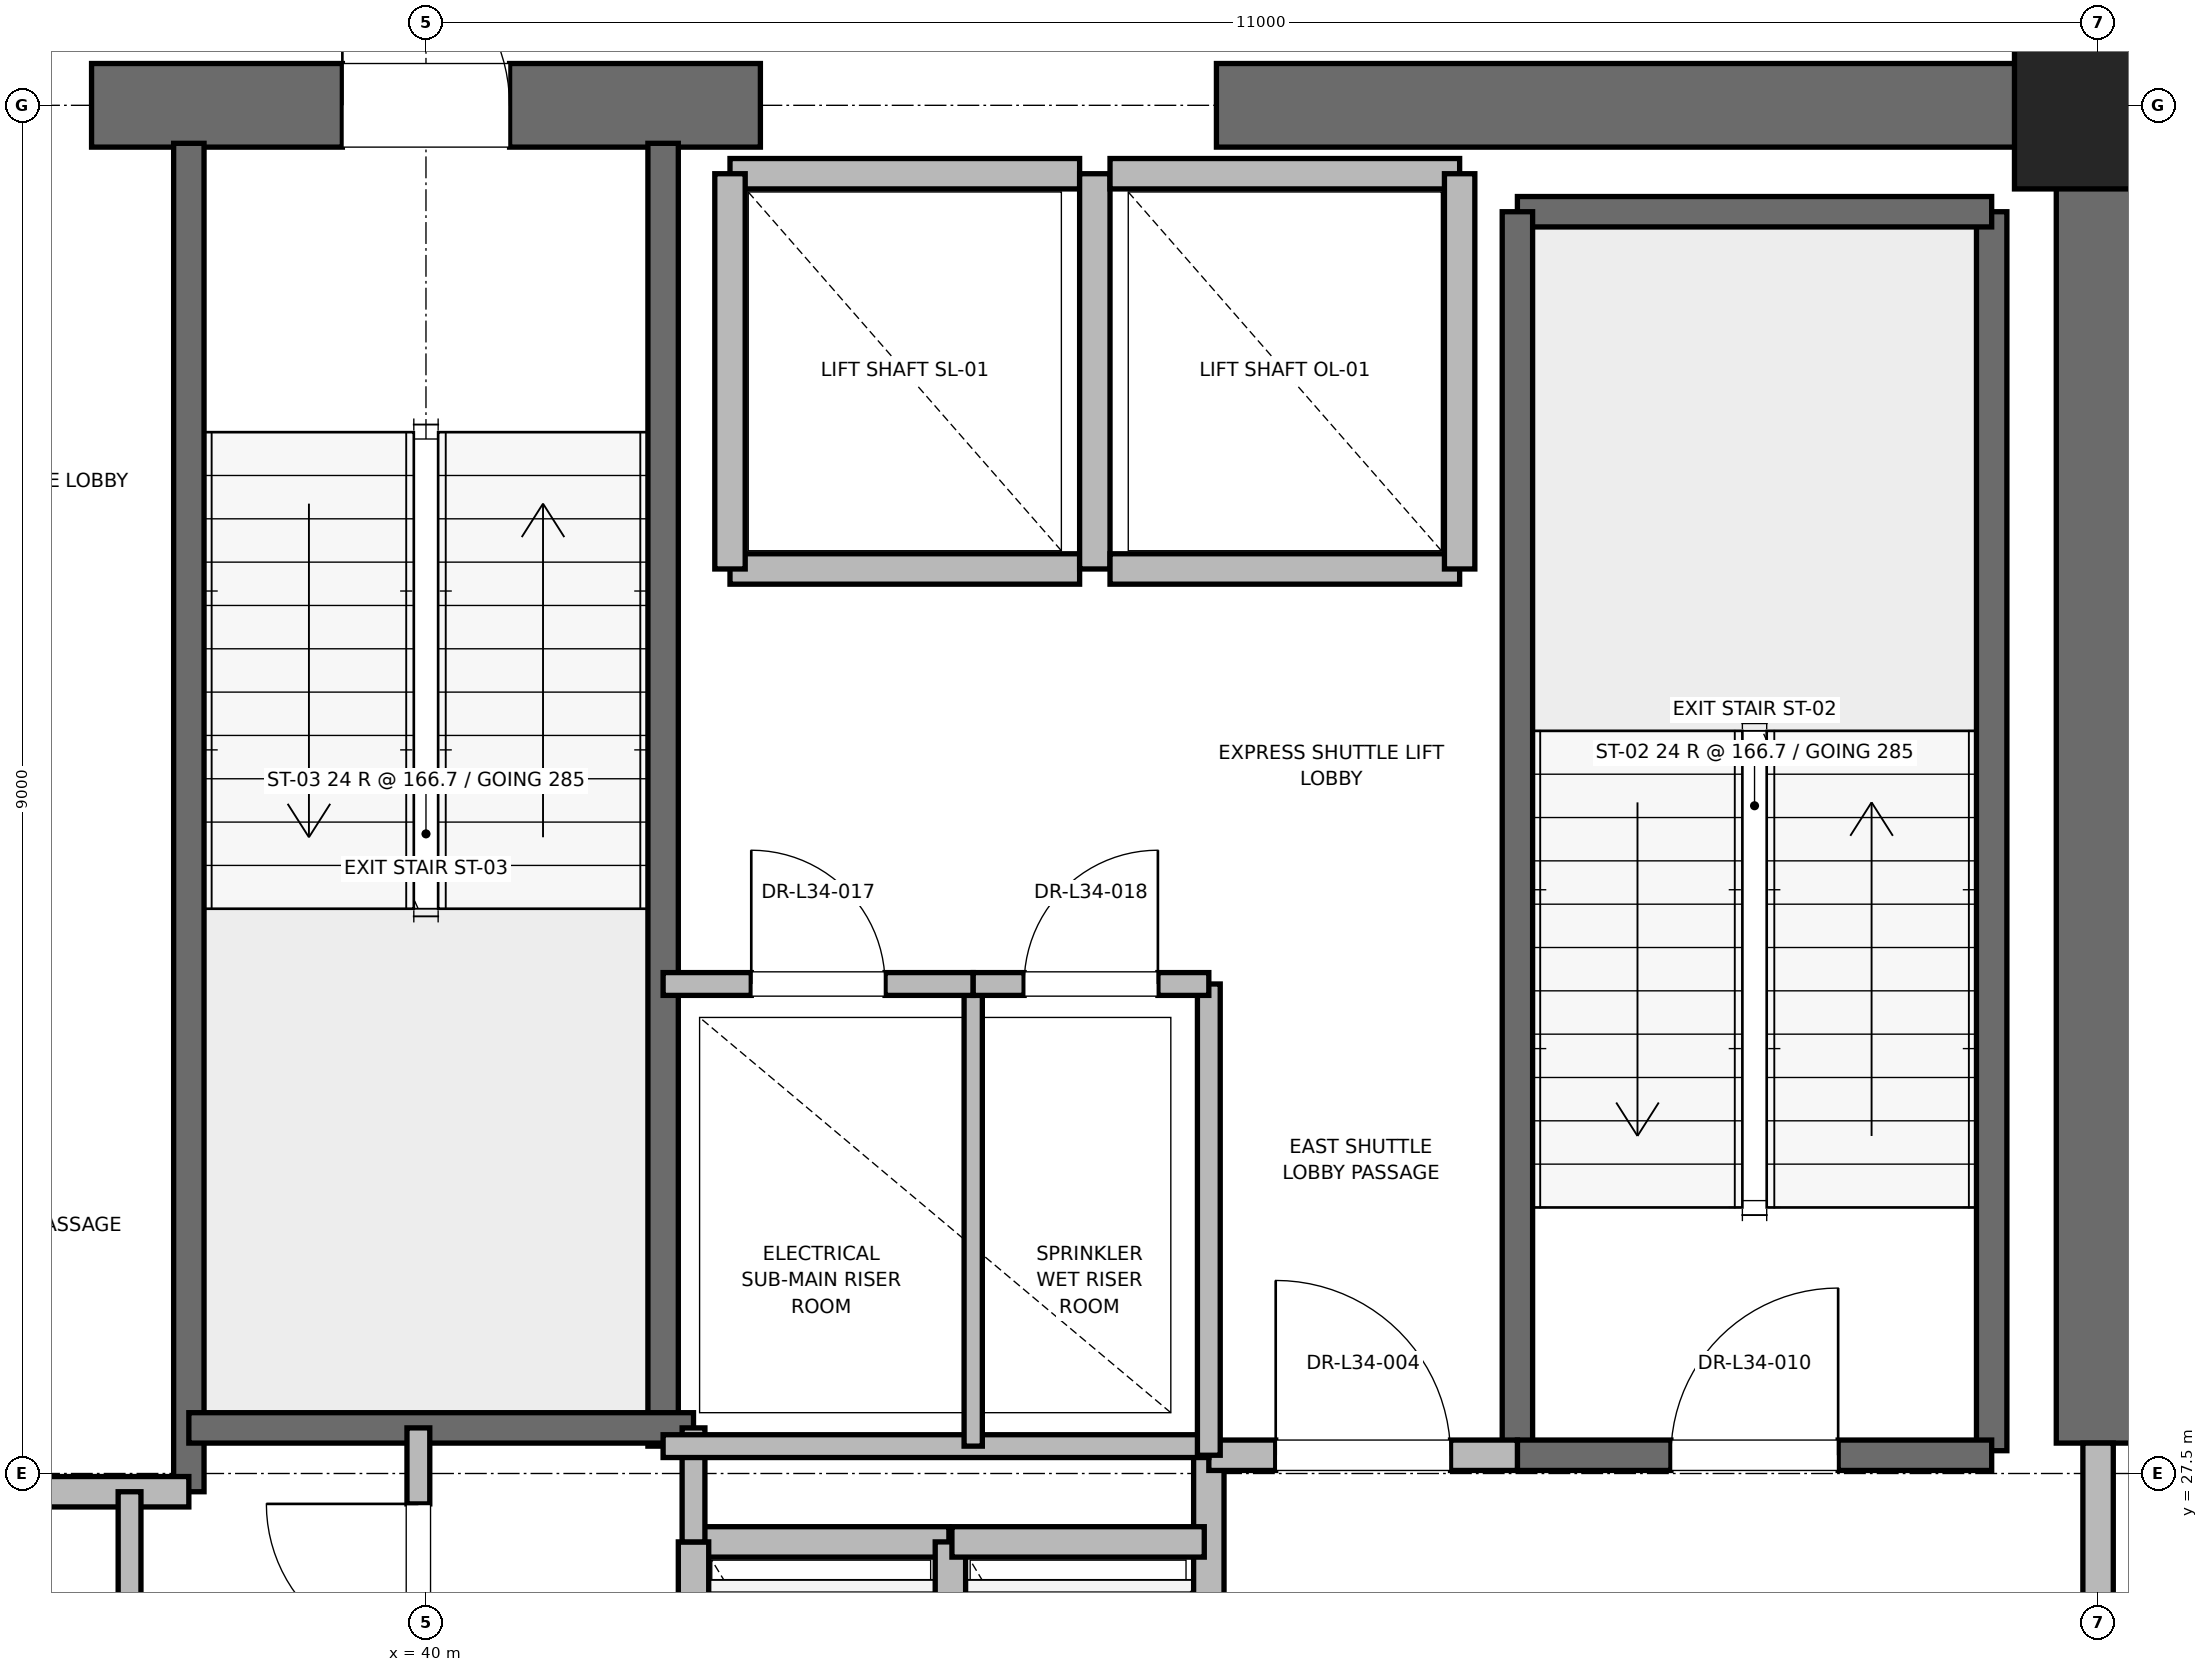
"""IFC4 building model, lengths in metres.
Left out: names, types, materials, properties, quantities, classifications, styles, units other than length and angle.
Written with IfcOpenShell. Run it as: python <this file> out.ifc"""

import sys

from ifc_helpers import new_model, si_unit, direction, frame, frame_2d, origin, origin_2d, place, context, subcontext, project, spatial, rectangle, extrude, element, fill, save


model = new_model("IFC4")
c1 = context("Model", 3, precision=1e-05, world=origin(), true_north=direction((0.0, 1.0)))
c2 = subcontext(c1, "Body", "Model", "MODEL_VIEW")
j1 = project(units=[si_unit("LENGTHUNIT", "METRE"), si_unit("PLANEANGLEUNIT", "RADIAN")], contexts=[c1])
p1 = place(None, origin())
s1 = spatial("IfcSite", under=j1, at=p1, CompositionType="ELEMENT")
p2 = place(p1, origin())
s2 = spatial("IfcBuilding", under=s1, at=p2, CompositionType="ELEMENT")
p3 = place(p2, frame((0.0, 0.0, 148.4)))
s3 = spatial("IfcBuildingStorey", under=s2, at=p3, CompositionType="ELEMENT", Elevation=148.4)
p4 = place(p3, frame((51.0, 36.5, 0.0), z_axis=(0.0, 0.0, 1.0), x_axis=(1.0, 0.0, 0.0)))
e1 = element("IfcColumn", 1, at=p4, inside=s3, PredefinedType="PILASTER", context=c2, shape_type="SweptSolid", body=[
    extrude(rectangle(XDim=1.1, YDim=1.1, at=origin_2d()), origin(), (0.0, 0.0, 1.0), 4.0),
])
p5 = place(p3, frame((37.8, 36.5, 0.0), z_axis=(0.0, 0.0, 1.0), x_axis=(1.0, 0.0, 0.0)))
e2 = element("IfcWall", 2, at=p5, inside=s3, PredefinedType="SHEAR", context=c2, shape_type="SweptSolid", body=[
    extrude(rectangle(XDim=4.4, YDim=0.55, at=frame_2d((2.2, 0.0))), origin(), (0.0, 0.0, 1.0), 3.775),
])
p6 = place(p5, frame((1.65, 0.0, 0.0)))
e3 = element("IfcOpeningElement", 3, at=p6, cuts=e2, PredefinedType="OPENING", context=c2, shape_type="SweptSolid", body=[
    extrude(rectangle(XDim=1.1, YDim=2.15, at=frame_2d((0.55, 1.075))), frame((0.0, 0.275, 0.0), z_axis=(0.0, -1.0, 0.0), x_axis=(1.0, 0.0, 0.0)), (0.0, 0.0, 1.0), 0.55),
])
p7 = place(p3, frame((45.2, 36.5, 0.0), z_axis=(0.0, 0.0, 1.0), x_axis=(1.0, 0.0, 0.0)))
e4 = element("IfcWall", 4, at=p7, inside=s3, PredefinedType="SHEAR", context=c2, shape_type="SweptSolid", body=[
    extrude(rectangle(XDim=5.8, YDim=0.55, at=frame_2d((2.9, 0.0))), origin(), (0.0, 0.0, 1.0), 3.775),
])
p8 = place(p3, frame((51.0, 27.7, 0.0), z_axis=(0.0, 0.0, 1.0), x_axis=(0.0, 1.0, 0.0)))
e5 = element("IfcWall", 5, at=p8, inside=s3, PredefinedType="SHEAR", context=c2, shape_type="SweptSolid", body=[
    extrude(rectangle(XDim=8.8, YDim=0.55, at=frame_2d((4.4, 0.0))), origin(), (0.0, 0.0, 1.0), 3.775),
])
p9 = place(p3, frame((50.3, 27.65, 0.0), z_axis=(0.0, 0.0, 1.0), x_axis=(0.0, 1.0, 0.0)))
e6 = element("IfcWall", 6, at=p9, inside=s3, PredefinedType="SOLIDWALL", context=c2, shape_type="SweptSolid", body=[
    extrude(rectangle(XDim=8.15, YDim=0.2, at=frame_2d((4.075, 0.0))), origin(), (0.0, 0.0, 1.0), 3.775),
])
p10 = place(p3, frame((47.18, 35.8, 0.0), z_axis=(0.0, 0.0, 1.0), x_axis=(1.0, 0.0, 0.0)))
e7 = element("IfcWall", 7, at=p10, inside=s3, PredefinedType="SOLIDWALL", context=c2, shape_type="SweptSolid", body=[
    extrude(rectangle(XDim=3.12, YDim=0.2, at=frame_2d((1.56, 0.0))), origin(), (0.0, 0.0, 1.0), 3.775),
])
p11 = place(p3, frame((47.18, 27.62, 0.0), z_axis=(0.0, 0.0, 1.0), x_axis=(0.0, 1.0, 0.0)))
e8 = element("IfcWall", 8, at=p11, inside=s3, PredefinedType="SOLIDWALL", context=c2, shape_type="SweptSolid", body=[
    extrude(rectangle(XDim=8.18, YDim=0.2, at=frame_2d((4.09, 0.0))), origin(), (0.0, 0.0, 1.0), 3.775),
])
p12 = place(p3, frame((47.18, 27.62, 0.0), z_axis=(0.0, 0.0, 1.0), x_axis=(1.0, 0.0, 0.0)))
e9 = element("IfcWall", 9, at=p12, inside=s3, PredefinedType="SOLIDWALL", context=c2, shape_type="SweptSolid", body=[
    extrude(rectangle(XDim=3.12, YDim=0.2, at=frame_2d((1.56, 0.0))), origin(), (0.0, 0.0, 1.0), 3.775),
])
p13 = place(p12, frame((1.01, 0.0, 0.0)))
e10 = element("IfcOpeningElement", 10, at=p13, cuts=e9, PredefinedType="OPENING", context=c2, shape_type="SweptSolid", body=[
    extrude(rectangle(XDim=1.1, YDim=2.15, at=frame_2d((0.55, 1.075))), frame((0.0, 0.1, 0.0), z_axis=(0.0, -1.0, 0.0), x_axis=(1.0, 0.0, 0.0)), (0.0, 0.0, 1.0), 0.2),
])
p14 = place(p3, frame((38.44, 27.38, 0.0), z_axis=(0.0, 0.0, 1.0), x_axis=(0.0, 1.0, 0.0)))
e11 = element("IfcWall", 11, at=p14, inside=s3, PredefinedType="SOLIDWALL", context=c2, shape_type="SweptSolid", body=[
    extrude(rectangle(XDim=8.87, YDim=0.2, at=frame_2d((4.435, 0.0))), origin(), (0.0, 0.0, 1.0), 3.775),
])
p15 = place(p3, frame((41.56, 27.68, 0.0), z_axis=(0.0, 0.0, 1.0), x_axis=(0.0, 1.0, 0.0)))
e12 = element("IfcWall", 12, at=p15, inside=s3, PredefinedType="SOLIDWALL", context=c2, shape_type="SweptSolid", body=[
    extrude(rectangle(XDim=8.57, YDim=0.2, at=frame_2d((4.285, 0.0))), origin(), (0.0, 0.0, 1.0), 3.775),
])
p16 = place(p3, frame((38.44, 27.8, 0.0), z_axis=(0.0, 0.0, 1.0), x_axis=(1.0, 0.0, 0.0)))
e13 = element("IfcWall", 13, at=p16, inside=s3, PredefinedType="SOLIDWALL", context=c2, shape_type="SweptSolid", body=[
    extrude(rectangle(XDim=3.32, YDim=0.2, at=frame_2d((1.66, 0.0))), origin(), (0.0, 0.0, 1.0), 3.775),
])
p17 = place(p3, frame((32.82, 27.38, 0.0), z_axis=(0.0, 0.0, 1.0), x_axis=(1.0, 0.0, 0.0)))
e14 = element("IfcWall", 14, at=p17, inside=s3, PredefinedType="PARTITIONING", context=c2, shape_type="SweptSolid", body=[
    extrude(rectangle(XDim=5.62, YDim=0.2, at=frame_2d((2.81, 0.0))), origin(), (0.0, 0.0, 1.0), 3.775),
])
p18 = place(p3, frame((45.15, 24.25, 0.0), z_axis=(0.0, 0.0, 1.0), x_axis=(0.0, 1.0, 0.0)))
e15 = element("IfcWall", 15, at=p18, inside=s3, PredefinedType="PARTITIONING", context=c2, shape_type="SweptSolid", body=[
    extrude(rectangle(XDim=3.37, YDim=0.2, at=frame_2d((1.685, 0.0))), origin(), (0.0, 0.0, 1.0), 3.775),
])
p19 = place(p3, frame((45.15, 27.62, 0.0), z_axis=(0.0, 0.0, 1.0), x_axis=(1.0, 0.0, 0.0)))
e16 = element("IfcWall", 16, at=p19, inside=s3, PredefinedType="PARTITIONING", context=c2, shape_type="SweptSolid", body=[
    extrude(rectangle(XDim=2.03, YDim=0.2, at=frame_2d((1.015, 0.0))), origin(), (0.0, 0.0, 1.0), 3.775),
])
p20 = place(p19, frame((0.44, 0.0, 0.0)))
e17 = element("IfcOpeningElement", 17, at=p20, cuts=e16, PredefinedType="OPENING", context=c2, shape_type="SweptSolid", body=[
    extrude(rectangle(XDim=1.15, YDim=2.2, at=frame_2d((0.575, 1.1))), frame((0.0, 0.1, 0.0), z_axis=(0.0, -1.0, 0.0), x_axis=(1.0, 0.0, 0.0)), (0.0, 0.0, 1.0), 0.2),
])
p21 = place(p3, frame((51.0, 24.3, 0.0), z_axis=(0.0, 0.0, 1.0), x_axis=(0.0, 1.0, 0.0)))
e18 = element("IfcWall", 18, at=p21, inside=s3, PredefinedType="PARTITIONING", context=c2, shape_type="SweptSolid", body=[
    extrude(rectangle(XDim=3.4, YDim=0.2, at=frame_2d((1.7, 0.0))), origin(), (0.0, 0.0, 1.0), 2.755),
])
p22 = place(p21, frame((1.125, 0.0, 0.0)))
e19 = element("IfcOpeningElement", 19, at=p22, cuts=e18, PredefinedType="OPENING", context=c2, shape_type="SweptSolid", body=[
    extrude(rectangle(XDim=1.15, YDim=2.2, at=frame_2d((0.575, 1.1))), frame((0.0, 0.1, 0.0), z_axis=(0.0, -1.0, 0.0), x_axis=(1.0, 0.0, 0.0)), (0.0, 0.0, 1.0), 0.2),
])
p23 = place(p3, frame((43.44, 27.05, 0.0), z_axis=(0.0, 0.0, 1.0), x_axis=(-1.0, 0.0, 0.0)))
e20 = element("IfcWall", 20, at=p23, inside=s3, PredefinedType="SOLIDWALL", context=c2, shape_type="SweptSolid", body=[
    extrude(rectangle(XDim=1.68, YDim=0.2, at=frame_2d((0.84, 0.0))), origin(), (0.0, 0.0, 1.0), 3.775),
])
for number, where, z_axis, x_axis in (
    (21, (41.76, 27.05, 0.0), (0.0, 0.0, 1.0), (0.0, -1.0, 0.0)),
    (22, (43.45, 24.45, 0.0), (0.0, 0.0, 1.0), (0.0, 1.0, 0.0)),
):
    element("IfcWall", number, at=place(p3, frame(where, z_axis=z_axis, x_axis=x_axis)), inside=s3, PredefinedType="SOLIDWALL", context=c2, shape_type="SweptSolid", body=[
        extrude(rectangle(XDim=2.6, YDim=0.2, at=frame_2d((1.3, 0.0))), origin(), (0.0, 0.0, 1.0), 3.775),
    ])
p24 = place(p3, frame((45.12, 27.05, 0.0), z_axis=(0.0, 0.0, 1.0), x_axis=(-1.0, 0.0, 0.0)))
e23 = element("IfcWall", 23, at=p24, inside=s3, PredefinedType="SOLIDWALL", context=c2, shape_type="SweptSolid", body=[
    extrude(rectangle(XDim=1.66, YDim=0.2, at=frame_2d((0.83, 0.0))), origin(), (0.0, 0.0, 1.0), 3.775),
])
p25 = place(p3, frame((42.0, 33.45, 0.0), z_axis=(0.0, 0.0, 1.0), x_axis=(1.0, 0.0, 0.0)))
e24 = element("IfcWall", 24, at=p25, inside=s3, PredefinedType="SOLIDWALL", context=c2, shape_type="SweptSolid", body=[
    extrude(rectangle(XDim=2.3, YDim=0.2, at=frame_2d((1.15, 0.0))), origin(), (0.0, 0.0, 1.0), 3.775),
])
p26 = place(p3, frame((44.3, 36.05, 0.0), z_axis=(0.0, 0.0, 1.0), x_axis=(-1.0, 0.0, 0.0)))
e25 = element("IfcWall", 25, at=p26, inside=s3, PredefinedType="SOLIDWALL", context=c2, shape_type="SweptSolid", body=[
    extrude(rectangle(XDim=2.3, YDim=0.2, at=frame_2d((1.15, 0.0))), origin(), (0.0, 0.0, 1.0), 2.755),
])
for number, where, z_axis, x_axis in (
    (26, (42.0, 36.05, 0.0), (0.0, 0.0, 1.0), (0.0, -1.0, 0.0)),
    (27, (44.4, 33.45, 0.0), (0.0, 0.0, 1.0), (0.0, 1.0, 0.0)),
):
    element("IfcWall", number, at=place(p3, frame(where, z_axis=z_axis, x_axis=x_axis)), inside=s3, PredefinedType="SOLIDWALL", context=c2, shape_type="SweptSolid", body=[
        extrude(rectangle(XDim=2.6, YDim=0.2, at=frame_2d((1.3, 0.0))), origin(), (0.0, 0.0, 1.0), 2.755),
    ])
p27 = place(p3, frame((44.5, 33.45, 0.0), z_axis=(0.0, 0.0, 1.0), x_axis=(1.0, 0.0, 0.0)))
e28 = element("IfcWall", 28, at=p27, inside=s3, PredefinedType="SOLIDWALL", context=c2, shape_type="SweptSolid", body=[
    extrude(rectangle(XDim=2.3, YDim=0.2, at=frame_2d((1.15, 0.0))), origin(), (0.0, 0.0, 1.0), 3.775),
])
p28 = place(p3, frame((46.8, 36.05, 0.0), z_axis=(0.0, 0.0, 1.0), x_axis=(-1.0, 0.0, 0.0)))
e29 = element("IfcWall", 29, at=p28, inside=s3, PredefinedType="SOLIDWALL", context=c2, shape_type="SweptSolid", body=[
    extrude(rectangle(XDim=2.3, YDim=0.2, at=frame_2d((1.15, 0.0))), origin(), (0.0, 0.0, 1.0), 2.755),
])
p29 = place(p3, frame((46.8, 33.45, 0.0), z_axis=(0.0, 0.0, 1.0), x_axis=(0.0, 1.0, 0.0)))
e30 = element("IfcWall", 30, at=p29, inside=s3, PredefinedType="SOLIDWALL", context=c2, shape_type="SweptSolid", body=[
    extrude(rectangle(XDim=2.6, YDim=0.2, at=frame_2d((1.3, 0.0))), origin(), (0.0, 0.0, 1.0), 3.775),
])
p30 = place(p3, frame((41.76, 27.05, 0.0), z_axis=(0.0, 0.0, 1.0), x_axis=(0.0, 1.0, 0.0)))
e31 = element("IfcWall", 31, at=p30, inside=s3, PredefinedType="PARTITIONING", context=c2, shape_type="SweptSolid", body=[
    extrude(rectangle(XDim=0.75, YDim=0.15, at=frame_2d((0.375, 0.0))), origin(), (0.0, 0.0, 1.0), 2.85),
])
p31 = place(p3, frame((39.95, 25.8, 0.0), z_axis=(0.0, 0.0, 1.0), x_axis=(0.0, 1.0, 0.0)))
e32 = element("IfcWall", 32, at=p31, inside=s3, PredefinedType="PARTITIONING", context=c2, shape_type="SweptSolid", body=[
    extrude(rectangle(XDim=2.0, YDim=0.15, at=frame_2d((1.0, 0.0))), origin(), (0.0, 0.0, 1.0), 2.85),
])
p32 = place(p31, frame((0.5, 0.0, 0.0)))
e33 = element("IfcOpeningElement", 33, at=p32, cuts=e32, PredefinedType="OPENING", context=c2, shape_type="SweptSolid", body=[
    extrude(rectangle(XDim=1.0, YDim=2.15, at=frame_2d((0.5, 1.075))), frame((0.0, 0.075, 0.0), z_axis=(0.0, -1.0, 0.0), x_axis=(1.0, 0.0, 0.0)), (0.0, 0.0, 1.0), 0.15),
])
p33 = place(p3, frame((38.05, 24.5, 0.0), z_axis=(0.0, 0.0, 1.0), x_axis=(0.0, 1.0, 0.0)))
e34 = element("IfcWall", 34, at=p33, inside=s3, PredefinedType="PARTITIONING", context=c2, shape_type="SweptSolid", body=[
    extrude(rectangle(XDim=2.88, YDim=0.15, at=frame_2d((1.44, 0.0))), origin(), (0.0, 0.0, 1.0), 2.85),
])
p34 = place(p33, frame((0.94, 0.0, 0.0)))
e35 = element("IfcOpeningElement", 35, at=p34, cuts=e34, PredefinedType="OPENING", context=c2, shape_type="SweptSolid", body=[
    extrude(rectangle(XDim=1.0, YDim=2.15, at=frame_2d((0.5, 1.075))), frame((0.0, 0.075, 0.0), z_axis=(0.0, -1.0, 0.0), x_axis=(1.0, 0.0, 0.0)), (0.0, 0.0, 1.0), 0.15),
])
p35 = place(p3, frame((41.56, 27.68, 0.0), z_axis=(0.0, 0.0, 1.0), x_axis=(1.0, 0.0, 0.0)))
e36 = element("IfcWall", 36, at=p35, inside=s3, PredefinedType="PARTITIONING", context=c2, shape_type="SweptSolid", body=[
    extrude(rectangle(XDim=3.59, YDim=0.15, at=frame_2d((1.795, 0.0))), origin(), (0.0, 0.0, 1.0), 2.85),
])
p36 = place(p3, frame((45.15, 27.62, 0.0), z_axis=(0.0, 0.0, 1.0), x_axis=(0.0, 1.0, 0.0)))
e37 = element("IfcWall", 37, at=p36, inside=s3, PredefinedType="PARTITIONING", context=c2, shape_type="SweptSolid", body=[
    extrude(rectangle(XDim=3.1, YDim=0.15, at=frame_2d((1.55, 0.0))), origin(), (0.0, 0.0, 1.0), 2.85),
])
p37 = place(p3, frame((43.6, 27.68, 0.0), z_axis=(0.0, 0.0, 1.0), x_axis=(0.0, 1.0, 0.0)))
e38 = element("IfcWall", 38, at=p37, inside=s3, PredefinedType="PARTITIONING", context=c2, shape_type="SweptSolid", body=[
    extrude(rectangle(XDim=3.04, YDim=0.12, at=frame_2d((1.52, 0.0))), origin(), (0.0, 0.0, 1.0), 2.85),
])
p38 = place(p3, frame((41.56, 30.72, 0.0), z_axis=(0.0, 0.0, 1.0), x_axis=(1.0, 0.0, 0.0)))
e39 = element("IfcWall", 39, at=p38, inside=s3, PredefinedType="PARTITIONING", context=c2, shape_type="SweptSolid", body=[
    extrude(rectangle(XDim=2.04, YDim=0.15, at=frame_2d((1.02, 0.0))), origin(), (0.0, 0.0, 1.0), 2.85),
])
p39 = place(p38, frame((0.58, 0.0, 0.0)))
e40 = element("IfcOpeningElement", 40, at=p39, cuts=e39, PredefinedType="OPENING", context=c2, shape_type="SweptSolid", body=[
    extrude(rectangle(XDim=0.88, YDim=2.1, at=frame_2d((0.44, 1.05))), frame((0.0, 0.075, 0.0), z_axis=(0.0, -1.0, 0.0), x_axis=(1.0, 0.0, 0.0)), (0.0, 0.0, 1.0), 0.15),
])
p40 = place(p3, frame((43.6, 30.72, 0.0), z_axis=(0.0, 0.0, 1.0), x_axis=(1.0, 0.0, 0.0)))
e41 = element("IfcWall", 41, at=p40, inside=s3, PredefinedType="PARTITIONING", context=c2, shape_type="SweptSolid", body=[
    extrude(rectangle(XDim=1.55, YDim=0.15, at=frame_2d((0.775, 0.0))), origin(), (0.0, 0.0, 1.0), 2.85),
])
p41 = place(p40, frame((0.335, 0.0, 0.0)))
e42 = element("IfcOpeningElement", 42, at=p41, cuts=e41, PredefinedType="OPENING", context=c2, shape_type="SweptSolid", body=[
    extrude(rectangle(XDim=0.88, YDim=2.1, at=frame_2d((0.44, 1.05))), frame((0.0, 0.075, 0.0), z_axis=(0.0, -1.0, 0.0), x_axis=(1.0, 0.0, 0.0)), (0.0, 0.0, 1.0), 0.15),
])
p42 = place(p13, origin())
e43 = element("IfcDoor", 43, at=p42, inside=s3, OperationType="SINGLE_SWING_RIGHT", PredefinedType="DOOR", context=c2, shape_type="SweptSolid", body=[
    extrude(rectangle(XDim=1.1, YDim=2.15, at=frame_2d((0.55, 1.075))), frame((0.0, 0.025, 0.0), z_axis=(0.0, -1.0, 0.0), x_axis=(1.0, 0.0, 0.0)), (0.0, 0.0, 1.0), 0.05),
])
fill(e10, e43)
p43 = place(p6, origin())
e44 = element("IfcDoor", 44, at=p43, inside=s3, OperationType="SINGLE_SWING_LEFT", PredefinedType="DOOR", context=c2, shape_type="SweptSolid", body=[
    extrude(rectangle(XDim=1.1, YDim=2.15, at=frame_2d((0.55, 1.075))), frame((0.0, 0.025, 0.0), z_axis=(0.0, -1.0, 0.0), x_axis=(1.0, 0.0, 0.0)), (0.0, 0.0, 1.0), 0.05),
])
fill(e3, e44)
p44 = place(p20, origin())
e45 = element("IfcDoor", 45, at=p44, inside=s3, OperationType="SINGLE_SWING_LEFT", PredefinedType="DOOR", context=c2, shape_type="SweptSolid", body=[
    extrude(rectangle(XDim=1.15, YDim=2.2, at=frame_2d((0.575, 1.1))), frame((0.0, 0.025, 0.0), z_axis=(0.0, -1.0, 0.0), x_axis=(1.0, 0.0, 0.0)), (0.0, 0.0, 1.0), 0.05),
])
fill(e17, e45)
p45 = place(p32, origin())
e46 = element("IfcDoor", 46, at=p45, inside=s3, OperationType="SINGLE_SWING_RIGHT", PredefinedType="DOOR", context=c2, shape_type="SweptSolid", body=[
    extrude(rectangle(XDim=1.0, YDim=2.15, at=frame_2d((0.5, 1.075))), frame((0.0, 0.025, 0.0), z_axis=(0.0, -1.0, 0.0), x_axis=(1.0, 0.0, 0.0)), (0.0, 0.0, 1.0), 0.05),
])
fill(e33, e46)
p46 = place(p39, origin())
e47 = element("IfcDoor", 47, at=p46, inside=s3, OperationType="SINGLE_SWING_LEFT", PredefinedType="DOOR", context=c2, shape_type="SweptSolid", body=[
    extrude(rectangle(XDim=0.88, YDim=2.1, at=frame_2d((0.44, 1.05))), frame((0.0, 0.025, 0.0), z_axis=(0.0, -1.0, 0.0), x_axis=(1.0, 0.0, 0.0)), (0.0, 0.0, 1.0), 0.05),
])
fill(e40, e47)
p47 = place(p41, origin())
e48 = element("IfcDoor", 48, at=p47, inside=s3, OperationType="SINGLE_SWING_RIGHT", PredefinedType="DOOR", context=c2, shape_type="SweptSolid", body=[
    extrude(rectangle(XDim=0.88, YDim=2.1, at=frame_2d((0.44, 1.05))), frame((0.0, 0.025, 0.0), z_axis=(0.0, -1.0, 0.0), x_axis=(1.0, 0.0, 0.0)), (0.0, 0.0, 1.0), 0.05),
])
fill(e42, e48)
save(model, sys.argv[1])
